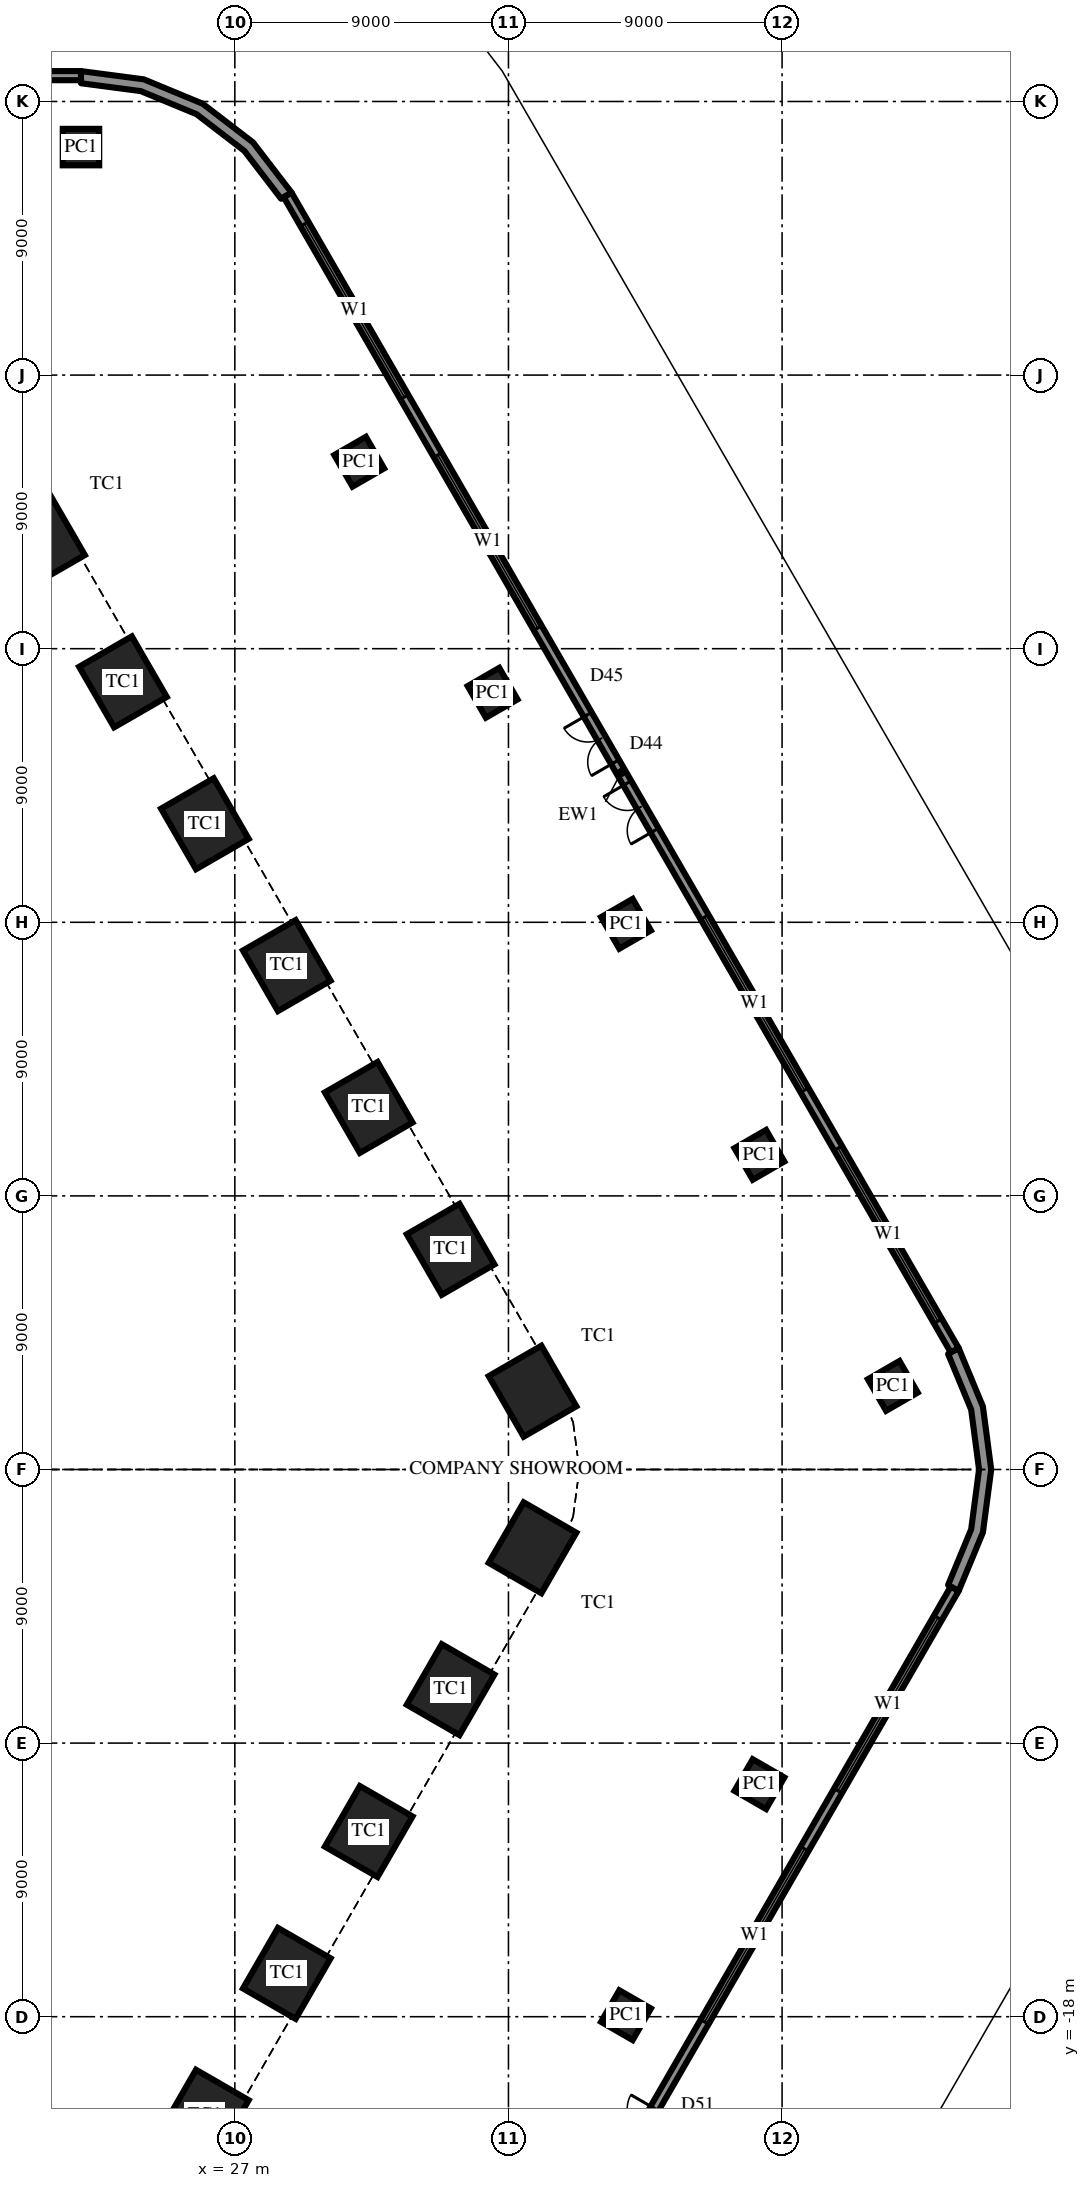
"""IFC4 building model, lengths in metres.
Left out: names, types, materials, properties, quantities, classifications, styles, units other than length and angle.
Written with IfcOpenShell. Run it as: python <this file> out.ifc"""

import sys

from ifc_helpers import new_model, si_unit, direction, frame, frame_2d, origin, origin_2d, place, context, subcontext, project, spatial, polyline, rectangle, outline, extrude, element, fill, save


model = new_model("IFC4")
c1 = context("Model", 3, precision=1e-05, world=origin(), true_north=direction((0.0, 1.0)))
c2 = subcontext(c1, "Body", "Model", "MODEL_VIEW")
j1 = project(units=[si_unit("LENGTHUNIT", "METRE"), si_unit("PLANEANGLEUNIT", "RADIAN")], contexts=[c1])
p1 = place(None, origin())
s1 = spatial("IfcSite", under=j1, at=p1, CompositionType="ELEMENT")
p2 = place(p1, origin())
s2 = spatial("IfcBuilding", under=s1, at=p2, CompositionType="ELEMENT")
p3 = place(p2, origin())
s3 = spatial("IfcBuildingStorey", under=s2, at=p3, CompositionType="ELEMENT", Elevation=0.0)
for number, where, z_axis, x_axis in (
    (1, (36.792, 2.575, 0.0), (0.0, 0.0, 1.0), (-0.5, 0.866, 0.0)),
    (2, (34.097, 7.242, 0.0), (0.0, 0.0, 1.0), (-0.5, 0.866, 0.0)),
    (3, (31.403, 11.908, 0.0), (0.0, 0.0, 1.0), (-0.5, 0.866, 0.0)),
    (4, (28.709, 16.575, 0.0), (0.0, 0.0, 1.0), (-0.5, 0.866, 0.0)),
    (5, (26.014, 21.242, 0.0), (0.0, 0.0, 1.0), (-0.5, 0.866, 0.0)),
    (6, (23.32, 25.908, 0.0), (0.0, 0.0, 1.0), (-0.5, 0.866, 0.0)),
    (7, (20.626, 30.575, 0.0), (0.0, 0.0, 1.0), (-0.5, 0.866, 0.0)),
    (8, (26.014, -21.242, 0.0), (0.0, 0.0, 1.0), (0.5, 0.866, 0.0)),
    (9, (28.709, -16.575, 0.0), (0.0, 0.0, 1.0), (0.5, 0.866, 0.0)),
    (10, (31.403, -11.908, 0.0), (0.0, 0.0, 1.0), (0.5, 0.866, 0.0)),
    (11, (34.097, -7.242, 0.0), (0.0, 0.0, 1.0), (0.5, 0.866, 0.0)),
    (12, (36.792, -2.575, 0.0), (0.0, 0.0, 1.0), (0.5, 0.866, 0.0)),
):
    element("IfcColumn", number, at=place(p3, frame(where, z_axis=z_axis, x_axis=x_axis)), inside=s3, PredefinedType="COLUMN", context=c2, shape_type="SweptSolid", body=[
        extrude(rectangle(XDim=2.3, YDim=2.0, at=origin_2d()), origin(), (0.0, 0.0, 1.0), 7.0),
    ])
for number, where, z_axis, x_axis in (
    (13, (48.642, 2.75, 0.0), (0.0, 0.0, 1.0), (-0.5, 0.866, 0.0)),
    (14, (44.254, 10.35, 0.0), (0.0, 0.0, 1.0), (-0.5, 0.866, 0.0)),
    (15, (39.866, 17.95, 0.0), (0.0, 0.0, 1.0), (-0.5, 0.866, 0.0)),
    (16, (35.478, 25.55, 0.0), (0.0, 0.0, 1.0), (-0.5, 0.866, 0.0)),
    (17, (31.09, 33.15, 0.0), (0.0, 0.0, 1.0), (-0.5, 0.866, 0.0)),
    (18, (21.939, 43.5, 0.0), (0.0, 0.0, 1.0), (-1.0, 0.0, 0.0)),
    (19, (39.866, -17.95, 0.0), (0.0, 0.0, 1.0), (0.5, 0.866, 0.0)),
    (20, (44.254, -10.35, 0.0), (0.0, 0.0, 1.0), (0.5, 0.866, 0.0)),
):
    element("IfcColumn", number, at=place(p3, frame(where, z_axis=z_axis, x_axis=x_axis)), inside=s3, PredefinedType="COLUMN", context=c2, shape_type="SweptSolid", body=[
        extrude(rectangle(XDim=1.2, YDim=1.2, at=origin_2d()), origin(), (0.0, 0.0, 1.0), 7.0),
    ])
p4 = place(p3, origin())
e21 = element("IfcWall", 21, at=p4, inside=s3, PredefinedType="SOLIDWALL", context=c2, shape_type="SweptSolid", body=[
    extrude(outline(polyline([(28.867, 42.0), (27.596, 43.657), (25.939, 44.928), (24.01, 45.727), (21.939, 46.0), (21.939, 45.6), (23.906, 45.341), (25.739, 44.582), (27.313, 43.374), (28.521, 41.8), (28.867, 42.0)])), origin(), (0.0, 0.0, 1.0), 6.65),
])
p5 = place(p3, origin())
e22 = element("IfcWall", 22, at=p5, inside=s3, PredefinedType="SOLIDWALL", context=c2, shape_type="SweptSolid", body=[
    extrude(outline(polyline([(50.807, -4.0), (51.606, -2.071), (51.879, 0.0), (51.606, 2.071), (50.807, 4.0), (50.46, 3.8), (51.22, 1.967), (51.479, 0.0), (51.22, -1.967), (50.46, -3.8), (50.807, -4.0)])), origin(), (0.0, 0.0, 1.0), 6.65),
])
p6 = place(p3, frame((50.677, 3.925, 0.0), z_axis=(0.0, 0.0, 1.0), x_axis=(-0.500002442456, 0.866023993627, 0.0)))
e23 = element("IfcWall", 23, at=p6, inside=s3, PredefinedType="SOLIDWALL", context=c2, shape_type="SweptSolid", body=[
    extrude(rectangle(XDim=43.879, YDim=0.3, at=frame_2d((21.939, 0.0))), origin(), (0.0, 0.0, 1.0), 6.65),
])
p7 = place(p6, frame((1.1, 0.0, 0.3)))
e24 = element("IfcOpeningElement", 24, at=p7, cuts=e23, PredefinedType="OPENING", context=c2, shape_type="SweptSolid", body=[
    extrude(rectangle(XDim=6.576, YDim=5.0, at=frame_2d((3.288, 2.5))), frame((0.0, 0.16, 0.0), z_axis=(0.0, -1.0, 0.0), x_axis=(1.0, 0.0, 0.0)), (0.0, 0.0, 1.0), 0.32),
])
p8 = place(p6, frame((9.875, 0.0, 0.3)))
e25 = element("IfcOpeningElement", 25, at=p8, cuts=e23, PredefinedType="OPENING", context=c2, shape_type="SweptSolid", body=[
    extrude(rectangle(XDim=6.576, YDim=5.0, at=frame_2d((3.288, 2.5))), frame((0.0, 0.16, 0.0), z_axis=(0.0, -1.0, 0.0), x_axis=(1.0, 0.0, 0.0)), (0.0, 0.0, 1.0), 0.32),
])
p9 = place(p6, frame((19.739, 0.0, 0.0)))
e26 = element("IfcOpeningElement", 26, at=p9, cuts=e23, PredefinedType="OPENING", context=c2, shape_type="SweptSolid", body=[
    extrude(rectangle(XDim=1.8, YDim=2.7, at=frame_2d((0.9, 1.35))), frame((0.0, 0.16, 0.0), z_axis=(0.0, -1.0, 0.0), x_axis=(1.0, 0.0, 0.0)), (0.0, 0.0, 1.0), 0.32),
])
p10 = place(p6, frame((22.339, 0.0, 0.0)))
e27 = element("IfcOpeningElement", 27, at=p10, cuts=e23, PredefinedType="OPENING", context=c2, shape_type="SweptSolid", body=[
    extrude(rectangle(XDim=1.8, YDim=2.7, at=frame_2d((0.9, 1.35))), frame((0.0, 0.16, 0.0), z_axis=(0.0, -1.0, 0.0), x_axis=(1.0, 0.0, 0.0)), (0.0, 0.0, 1.0), 0.32),
])
p11 = place(p6, frame((27.427, 0.0, 0.3)))
e28 = element("IfcOpeningElement", 28, at=p11, cuts=e23, PredefinedType="OPENING", context=c2, shape_type="SweptSolid", body=[
    extrude(rectangle(XDim=6.576, YDim=5.0, at=frame_2d((3.288, 2.5))), frame((0.0, 0.16, 0.0), z_axis=(0.0, -1.0, 0.0), x_axis=(1.0, 0.0, 0.0)), (0.0, 0.0, 1.0), 0.32),
])
p12 = place(p6, frame((36.203, 0.0, 0.3)))
e29 = element("IfcOpeningElement", 29, at=p12, cuts=e23, PredefinedType="OPENING", context=c2, shape_type="SweptSolid", body=[
    extrude(rectangle(XDim=6.576, YDim=5.0, at=frame_2d((3.288, 2.5))), frame((0.0, 0.16, 0.0), z_axis=(0.0, -1.0, 0.0), x_axis=(1.0, 0.0, 0.0)), (0.0, 0.0, 1.0), 0.32),
])
p13 = place(p3, frame((21.939, 45.85, 0.0), z_axis=(0.0, 0.0, 1.0), x_axis=(-1.0, 0.0, 0.0)))
e30 = element("IfcWall", 30, at=p13, inside=s3, PredefinedType="SOLIDWALL", context=c2, shape_type="SweptSolid", body=[
    extrude(rectangle(XDim=43.878, YDim=0.3, at=frame_2d((21.939, 0.0))), origin(), (0.0, 0.0, 1.0), 6.65),
])
p14 = place(p13, frame((1.1, 0.0, 0.3)))
e31 = element("IfcOpeningElement", 31, at=p14, cuts=e30, PredefinedType="OPENING", context=c2, shape_type="SweptSolid", body=[
    extrude(rectangle(XDim=6.576, YDim=5.0, at=frame_2d((3.288, 2.5))), frame((0.0, 0.16, 0.0), z_axis=(0.0, -1.0, 0.0), x_axis=(1.0, 0.0, 0.0)), (0.0, 0.0, 1.0), 0.32),
])
p15 = place(p13, frame((9.875, 0.0, 0.0)))
e32 = element("IfcOpeningElement", 32, at=p15, cuts=e30, PredefinedType="OPENING", context=c2, shape_type="SweptSolid", body=[
    extrude(rectangle(XDim=1.8, YDim=2.4, at=frame_2d((0.9, 1.2))), frame((0.0, 0.16, 0.0), z_axis=(0.0, -1.0, 0.0), x_axis=(1.0, 0.0, 0.0)), (0.0, 0.0, 1.0), 0.32),
])
p16 = place(p13, frame((11.976, 0.0, 0.3)))
e33 = element("IfcOpeningElement", 33, at=p16, cuts=e30, PredefinedType="OPENING", context=c2, shape_type="SweptSolid", body=[
    extrude(rectangle(XDim=4.476, YDim=5.0, at=frame_2d((2.238, 2.5))), frame((0.0, 0.16, 0.0), z_axis=(0.0, -1.0, 0.0), x_axis=(1.0, 0.0, 0.0)), (0.0, 0.0, 1.0), 0.32),
])
p17 = place(p13, frame((20.189, 0.0, 0.0)))
e34 = element("IfcOpeningElement", 34, at=p17, cuts=e30, PredefinedType="OPENING", context=c2, shape_type="SweptSolid", body=[
    extrude(rectangle(XDim=3.5, YDim=4.5, at=frame_2d((1.75, 2.25))), frame((0.0, 0.16, 0.0), z_axis=(0.0, -1.0, 0.0), x_axis=(1.0, 0.0, 0.0)), (0.0, 0.0, 1.0), 0.32),
])
p18 = place(p13, frame((32.203, 0.0, 0.0)))
e35 = element("IfcOpeningElement", 35, at=p18, cuts=e30, PredefinedType="OPENING", context=c2, shape_type="SweptSolid", body=[
    extrude(rectangle(XDim=1.8, YDim=2.4, at=frame_2d((0.9, 1.2))), frame((0.0, 0.16, 0.0), z_axis=(0.0, -1.0, 0.0), x_axis=(1.0, 0.0, 0.0)), (0.0, 0.0, 1.0), 0.32),
])
p19 = place(p13, frame((27.427, 0.0, 0.3)))
e36 = element("IfcOpeningElement", 36, at=p19, cuts=e30, PredefinedType="OPENING", context=c2, shape_type="SweptSolid", body=[
    extrude(rectangle(XDim=4.476, YDim=5.0, at=frame_2d((2.238, 2.5))), frame((0.0, 0.16, 0.0), z_axis=(0.0, -1.0, 0.0), x_axis=(1.0, 0.0, 0.0)), (0.0, 0.0, 1.0), 0.32),
])
p20 = place(p13, frame((36.203, 0.0, 0.3)))
e37 = element("IfcOpeningElement", 37, at=p20, cuts=e30, PredefinedType="OPENING", context=c2, shape_type="SweptSolid", body=[
    extrude(rectangle(XDim=6.576, YDim=5.0, at=frame_2d((3.288, 2.5))), frame((0.0, 0.16, 0.0), z_axis=(0.0, -1.0, 0.0), x_axis=(1.0, 0.0, 0.0)), (0.0, 0.0, 1.0), 0.32),
])
p21 = place(p3, frame((28.738, -41.925, 0.0), z_axis=(0.0, 0.0, 1.0), x_axis=(0.500002442456, 0.866023993627, 0.0)))
e38 = element("IfcWall", 38, at=p21, inside=s3, PredefinedType="SOLIDWALL", context=c2, shape_type="SweptSolid", body=[
    extrude(rectangle(XDim=43.879, YDim=0.3, at=frame_2d((21.939, 0.0))), origin(), (0.0, 0.0, 1.0), 6.65),
])
p22 = place(p21, frame((1.1, 0.0, 0.3)))
e39 = element("IfcOpeningElement", 39, at=p22, cuts=e38, PredefinedType="OPENING", context=c2, shape_type="SweptSolid", body=[
    extrude(rectangle(XDim=6.576, YDim=5.0, at=frame_2d((3.288, 2.5))), frame((0.0, 0.16, 0.0), z_axis=(0.0, -1.0, 0.0), x_axis=(1.0, 0.0, 0.0)), (0.0, 0.0, 1.0), 0.32),
])
p23 = place(p21, frame((9.875, 0.0, 0.3)))
e40 = element("IfcOpeningElement", 40, at=p23, cuts=e38, PredefinedType="OPENING", context=c2, shape_type="SweptSolid", body=[
    extrude(rectangle(XDim=6.576, YDim=5.0, at=frame_2d((3.288, 2.5))), frame((0.0, 0.16, 0.0), z_axis=(0.0, -1.0, 0.0), x_axis=(1.0, 0.0, 0.0)), (0.0, 0.0, 1.0), 0.32),
])
p24 = place(p21, frame((19.739, 0.0, 0.0)))
e41 = element("IfcOpeningElement", 41, at=p24, cuts=e38, PredefinedType="OPENING", context=c2, shape_type="SweptSolid", body=[
    extrude(rectangle(XDim=1.8, YDim=2.7, at=frame_2d((0.9, 1.35))), frame((0.0, 0.16, 0.0), z_axis=(0.0, -1.0, 0.0), x_axis=(1.0, 0.0, 0.0)), (0.0, 0.0, 1.0), 0.32),
])
p25 = place(p21, frame((22.339, 0.0, 0.0)))
e42 = element("IfcOpeningElement", 42, at=p25, cuts=e38, PredefinedType="OPENING", context=c2, shape_type="SweptSolid", body=[
    extrude(rectangle(XDim=1.8, YDim=2.7, at=frame_2d((0.9, 1.35))), frame((0.0, 0.16, 0.0), z_axis=(0.0, -1.0, 0.0), x_axis=(1.0, 0.0, 0.0)), (0.0, 0.0, 1.0), 0.32),
])
p26 = place(p21, frame((27.427, 0.0, 0.3)))
e43 = element("IfcOpeningElement", 43, at=p26, cuts=e38, PredefinedType="OPENING", context=c2, shape_type="SweptSolid", body=[
    extrude(rectangle(XDim=6.576, YDim=5.0, at=frame_2d((3.288, 2.5))), frame((0.0, 0.16, 0.0), z_axis=(0.0, -1.0, 0.0), x_axis=(1.0, 0.0, 0.0)), (0.0, 0.0, 1.0), 0.32),
])
p27 = place(p21, frame((36.203, 0.0, 0.3)))
e44 = element("IfcOpeningElement", 44, at=p27, cuts=e38, PredefinedType="OPENING", context=c2, shape_type="SweptSolid", body=[
    extrude(rectangle(XDim=6.576, YDim=5.0, at=frame_2d((3.288, 2.5))), frame((0.0, 0.16, 0.0), z_axis=(0.0, -1.0, 0.0), x_axis=(1.0, 0.0, 0.0)), (0.0, 0.0, 1.0), 0.32),
])
p28 = place(p7, origin())
e45 = element("IfcWindow", 45, at=p28, inside=s3, PartitioningType="SINGLE_PANEL", PredefinedType="WINDOW", context=c2, shape_type="SweptSolid", body=[
    extrude(rectangle(XDim=6.576, YDim=5.0, at=frame_2d((3.288, 2.5))), frame((0.0, 0.03, 0.0), z_axis=(0.0, -1.0, 0.0), x_axis=(1.0, 0.0, 0.0)), (0.0, 0.0, 1.0), 0.06),
])
fill(e24, e45)
p29 = place(p8, origin())
e46 = element("IfcWindow", 46, at=p29, inside=s3, PartitioningType="SINGLE_PANEL", PredefinedType="WINDOW", context=c2, shape_type="SweptSolid", body=[
    extrude(rectangle(XDim=6.576, YDim=5.0, at=frame_2d((3.288, 2.5))), frame((0.0, 0.03, 0.0), z_axis=(0.0, -1.0, 0.0), x_axis=(1.0, 0.0, 0.0)), (0.0, 0.0, 1.0), 0.06),
])
fill(e25, e46)
p30 = place(p9, origin())
e47 = element("IfcDoor", 47, at=p30, inside=s3, OperationType="DOUBLE_DOOR_SINGLE_SWING", PredefinedType="DOOR", context=c2, shape_type="SweptSolid", body=[
    extrude(rectangle(XDim=1.8, YDim=2.7, at=frame_2d((0.9, 1.35))), frame((0.0, 0.025, 0.0), z_axis=(0.0, -1.0, 0.0), x_axis=(1.0, 0.0, 0.0)), (0.0, 0.0, 1.0), 0.05),
])
fill(e26, e47)
p31 = place(p10, origin())
e48 = element("IfcDoor", 48, at=p31, inside=s3, OperationType="DOUBLE_DOOR_SINGLE_SWING", PredefinedType="DOOR", context=c2, shape_type="SweptSolid", body=[
    extrude(rectangle(XDim=1.8, YDim=2.7, at=frame_2d((0.9, 1.35))), frame((0.0, 0.025, 0.0), z_axis=(0.0, -1.0, 0.0), x_axis=(1.0, 0.0, 0.0)), (0.0, 0.0, 1.0), 0.05),
])
fill(e27, e48)
p32 = place(p11, origin())
e49 = element("IfcWindow", 49, at=p32, inside=s3, PartitioningType="SINGLE_PANEL", PredefinedType="WINDOW", context=c2, shape_type="SweptSolid", body=[
    extrude(rectangle(XDim=6.576, YDim=5.0, at=frame_2d((3.288, 2.5))), frame((0.0, 0.03, 0.0), z_axis=(0.0, -1.0, 0.0), x_axis=(1.0, 0.0, 0.0)), (0.0, 0.0, 1.0), 0.06),
])
fill(e28, e49)
p33 = place(p12, origin())
e50 = element("IfcWindow", 50, at=p33, inside=s3, PartitioningType="SINGLE_PANEL", PredefinedType="WINDOW", context=c2, shape_type="SweptSolid", body=[
    extrude(rectangle(XDim=6.576, YDim=5.0, at=frame_2d((3.288, 2.5))), frame((0.0, 0.03, 0.0), z_axis=(0.0, -1.0, 0.0), x_axis=(1.0, 0.0, 0.0)), (0.0, 0.0, 1.0), 0.06),
])
fill(e29, e50)
p34 = place(p26, origin())
e51 = element("IfcWindow", 51, at=p34, inside=s3, PartitioningType="SINGLE_PANEL", PredefinedType="WINDOW", context=c2, shape_type="SweptSolid", body=[
    extrude(rectangle(XDim=6.576, YDim=5.0, at=frame_2d((3.288, 2.5))), frame((0.0, 0.03, 0.0), z_axis=(0.0, -1.0, 0.0), x_axis=(1.0, 0.0, 0.0)), (0.0, 0.0, 1.0), 0.06),
])
fill(e43, e51)
p35 = place(p27, origin())
e52 = element("IfcWindow", 52, at=p35, inside=s3, PartitioningType="SINGLE_PANEL", PredefinedType="WINDOW", context=c2, shape_type="SweptSolid", body=[
    extrude(rectangle(XDim=6.576, YDim=5.0, at=frame_2d((3.288, 2.5))), frame((0.0, 0.03, 0.0), z_axis=(0.0, -1.0, 0.0), x_axis=(1.0, 0.0, 0.0)), (0.0, 0.0, 1.0), 0.06),
])
fill(e44, e52)
save(model, sys.argv[1])
